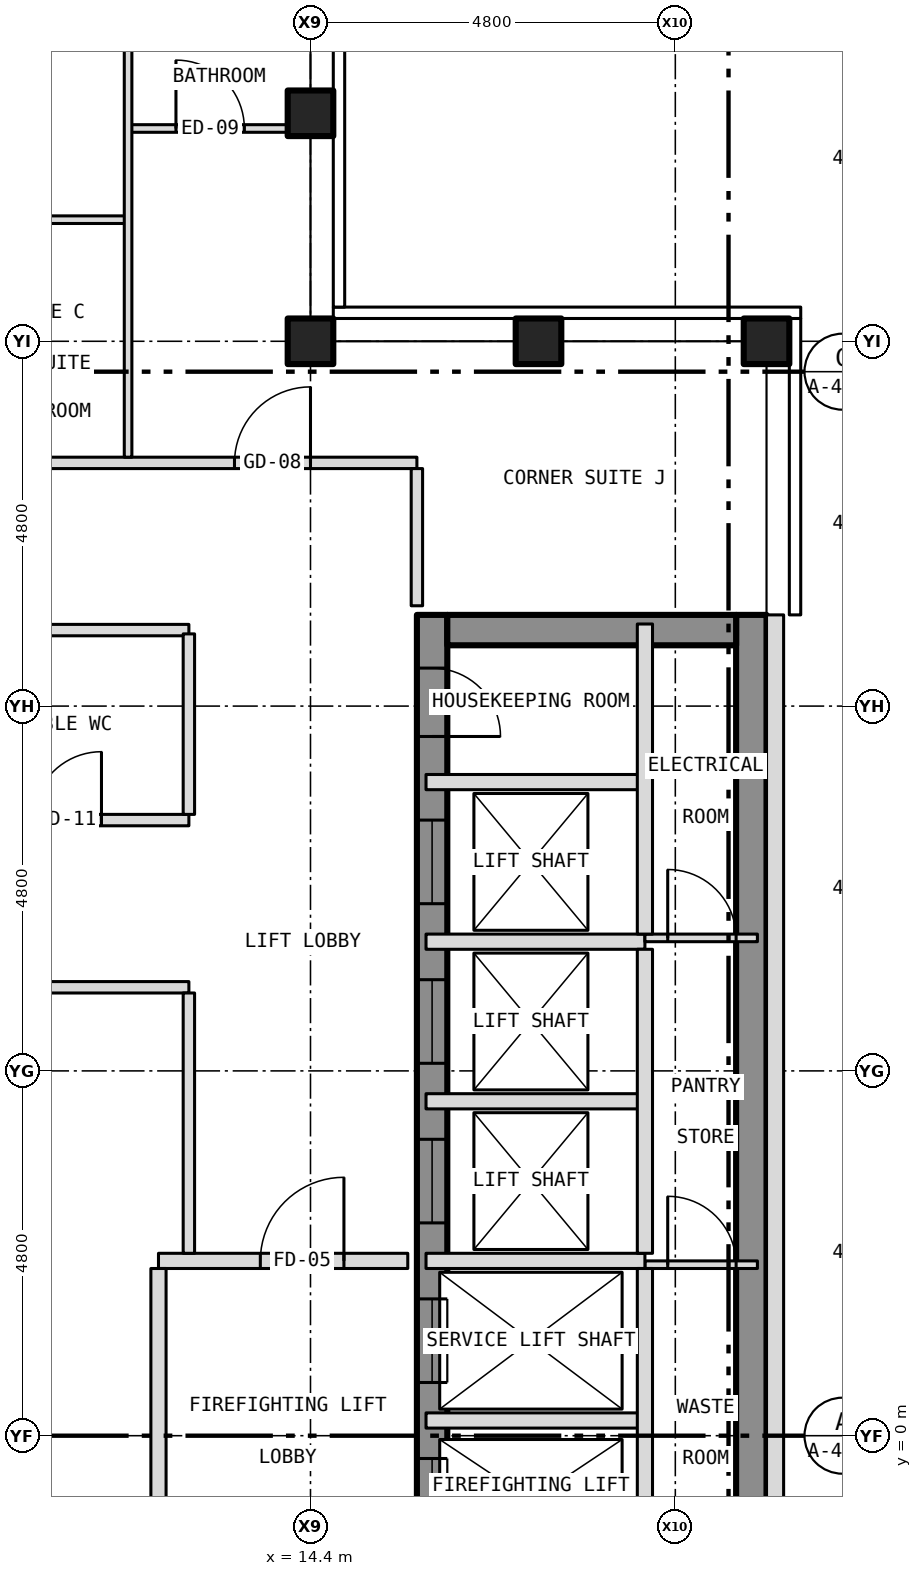
"""IFC4 building model, lengths in metres.
Left out: names, types, materials, properties, quantities, classifications, styles, units other than length and angle.
Written with IfcOpenShell. Run it as: python <this file> out.ifc"""

import sys

from ifc_helpers import new_model, si_unit, direction, frame, frame_2d, origin, origin_2d, place, context, subcontext, project, spatial, rectangle, hollow_rectangle, extrude, element, fill, save


model = new_model("IFC4")
c1 = context("Model", 3, precision=1e-05, world=origin(), true_north=direction((0.0, 1.0)))
c2 = subcontext(c1, "Body", "Model", "MODEL_VIEW")
j1 = project(units=[si_unit("LENGTHUNIT", "METRE"), si_unit("PLANEANGLEUNIT", "RADIAN")], contexts=[c1])
p1 = place(None, origin())
s1 = spatial("IfcSite", under=j1, at=p1, CompositionType="ELEMENT")
p2 = place(p1, origin())
s2 = spatial("IfcBuilding", under=s1, at=p2, CompositionType="ELEMENT")
p3 = place(p2, frame((0.0, 0.0, 255.0)))
s3 = spatial("IfcBuildingStorey", under=s2, at=p3, CompositionType="ELEMENT", Elevation=255.0)
for number, where, z_axis, x_axis in (
    (1, (20.4, 14.4, -0.15), (0.0, 0.0, 1.0), (1.0, 0.0, 0.0)),
    (2, (14.4, 14.4, -0.15), (0.0, 0.0, 1.0), (1.0, 0.0, 0.0)),
    (3, (14.4, 17.4, -0.15), (0.0, 0.0, 1.0), (1.0, 0.0, 0.0)),
    (4, (17.4, 14.4, -0.15), (0.0, 0.0, 1.0), (1.0, 0.0, 0.0)),
):
    element("IfcColumn", number, at=place(p3, frame(where, z_axis=z_axis, x_axis=x_axis)), inside=s3, PredefinedType="COLUMN", context=c2, shape_type="SweptSolid", body=[
        extrude(hollow_rectangle(XDim=0.6, YDim=0.6, WallThickness=0.03, at=origin_2d()), origin(), (0.0, 0.0, 1.0), 3.5),
    ])
p4 = place(p3, frame((16.0, -10.8, 0.0), z_axis=(0.0, 0.0, 1.0), x_axis=(0.0, 1.0, 0.0)))
e5 = element("IfcWall", 5, at=p4, inside=s3, PredefinedType="SHEAR", context=c2, shape_type="SweptSolid", body=[
    extrude(rectangle(XDim=21.6, YDim=0.4, at=frame_2d((10.8, 0.0))), origin(), (0.0, 0.0, 1.0), 3.25),
])
p5 = place(p4, frame((9.4, 0.0, 0.0)))
e6 = element("IfcOpeningElement", 6, at=p5, cuts=e5, PredefinedType="OPENING", context=c2, shape_type="SweptSolid", body=[
    extrude(rectangle(XDim=1.1, YDim=2.1, at=frame_2d((0.55, 1.05))), frame((0.0, 0.212, 0.0), z_axis=(0.0, -1.0, 0.0), x_axis=(1.0, 0.0, 0.0)), (0.0, 0.0, 1.0), 0.424),
])
p6 = place(p4, frame((11.5, 0.0, 0.0)))
e7 = element("IfcOpeningElement", 7, at=p6, cuts=e5, PredefinedType="OPENING", context=c2, shape_type="SweptSolid", body=[
    extrude(rectangle(XDim=1.1, YDim=2.1, at=frame_2d((0.55, 1.05))), frame((0.0, 0.212, 0.0), z_axis=(0.0, -1.0, 0.0), x_axis=(1.0, 0.0, 0.0)), (0.0, 0.0, 1.0), 0.424),
])
p7 = place(p4, frame((13.6, 0.0, 0.0)))
e8 = element("IfcOpeningElement", 8, at=p7, cuts=e5, PredefinedType="OPENING", context=c2, shape_type="SweptSolid", body=[
    extrude(rectangle(XDim=1.1, YDim=2.1, at=frame_2d((0.55, 1.05))), frame((0.0, 0.212, 0.0), z_axis=(0.0, -1.0, 0.0), x_axis=(1.0, 0.0, 0.0)), (0.0, 0.0, 1.0), 0.424),
])
p8 = place(p4, frame((15.7, 0.0, 0.0)))
e9 = element("IfcOpeningElement", 9, at=p8, cuts=e5, PredefinedType="OPENING", context=c2, shape_type="SweptSolid", body=[
    extrude(rectangle(XDim=1.1, YDim=2.1, at=frame_2d((0.55, 1.05))), frame((0.0, 0.212, 0.0), z_axis=(0.0, -1.0, 0.0), x_axis=(1.0, 0.0, 0.0)), (0.0, 0.0, 1.0), 0.424),
])
p9 = place(p4, frame((17.8, 0.0, 0.0)))
e10 = element("IfcOpeningElement", 10, at=p9, cuts=e5, PredefinedType="OPENING", context=c2, shape_type="SweptSolid", body=[
    extrude(rectangle(XDim=1.1, YDim=2.1, at=frame_2d((0.55, 1.05))), frame((0.0, 0.212, 0.0), z_axis=(0.0, -1.0, 0.0), x_axis=(1.0, 0.0, 0.0)), (0.0, 0.0, 1.0), 0.424),
])
p10 = place(p4, frame((5.642, 0.0, 0.0)))
e11 = element("IfcOpeningElement", 11, at=p10, cuts=e5, PredefinedType="OPENING", context=c2, shape_type="SweptSolid", body=[
    extrude(rectangle(XDim=1.1, YDim=2.1, at=frame_2d((0.55, 1.05))), frame((0.0, 0.212, 0.0), z_axis=(0.0, -1.0, 0.0), x_axis=(1.0, 0.0, 0.0)), (0.0, 0.0, 1.0), 0.424),
])
p11 = place(p4, frame((7.5, 0.0, 0.0)))
e12 = element("IfcOpeningElement", 12, at=p11, cuts=e5, PredefinedType="OPENING", context=c2, shape_type="SweptSolid", body=[
    extrude(rectangle(XDim=1.1, YDim=2.1, at=frame_2d((0.55, 1.05))), frame((0.0, 0.212, 0.0), z_axis=(0.0, -1.0, 0.0), x_axis=(1.0, 0.0, 0.0)), (0.0, 0.0, 1.0), 0.424),
])
p12 = place(p4, frame((20.0, 0.0, 0.0)))
e13 = element("IfcOpeningElement", 13, at=p12, cuts=e5, PredefinedType="OPENING", context=c2, shape_type="SweptSolid", body=[
    extrude(rectangle(XDim=0.9, YDim=2.1, at=frame_2d((0.45, 1.05))), frame((0.0, 0.212, 0.0), z_axis=(0.0, -1.0, 0.0), x_axis=(1.0, 0.0, 0.0)), (0.0, 0.0, 1.0), 0.424),
])
p13 = place(p3, frame((20.2, -10.8, 0.0), z_axis=(0.0, 0.0, 1.0), x_axis=(0.0, 1.0, 0.0)))
e14 = element("IfcWall", 14, at=p13, inside=s3, PredefinedType="SHEAR", context=c2, shape_type="SweptSolid", body=[
    extrude(rectangle(XDim=21.6, YDim=0.4, at=frame_2d((10.8, 0.0))), origin(), (0.0, 0.0, 1.0), 3.25),
])
p14 = place(p3, frame((16.2, 10.6, 0.0), z_axis=(0.0, 0.0, 1.0), x_axis=(1.0, 0.0, 0.0)))
e15 = element("IfcWall", 15, at=p14, inside=s3, PredefinedType="SHEAR", context=c2, shape_type="SweptSolid", body=[
    extrude(rectangle(XDim=3.8, YDim=0.4, at=frame_2d((1.9, 0.0))), origin(), (0.0, 0.0, 1.0), 3.25),
])
p15 = place(p3, frame((20.512, -10.8, 0.0), z_axis=(0.0, 0.0, 1.0), x_axis=(0.0, 1.0, 0.0)))
e16 = element("IfcWall", 16, at=p15, inside=s3, PredefinedType="SOLIDWALL", context=c2, shape_type="SweptSolid", body=[
    extrude(rectangle(XDim=21.6, YDim=0.225, at=frame_2d((10.8, 0.0))), origin(), (0.0, 0.0, 1.0), 3.5),
])
p16 = place(p15, frame((2.95, 0.0, 1.0)))
e17 = element("IfcOpeningElement", 17, at=p16, cuts=e16, PredefinedType="OPENING", context=c2, shape_type="SweptSolid", body=[
    extrude(rectangle(XDim=0.6, YDim=1.5, at=frame_2d((0.3, 0.75))), frame((0.0, 0.125, 0.0), z_axis=(0.0, -1.0, 0.0), x_axis=(1.0, 0.0, 0.0)), (0.0, 0.0, 1.0), 0.249),
])
p17 = place(p3, frame((15.92, 0.2, 0.0), z_axis=(0.0, 0.0, 1.0), x_axis=(1.0, 0.0, 0.0)))
e18 = element("IfcWall", 18, at=p17, inside=s3, PredefinedType="PARTITIONING", context=c2, shape_type="SweptSolid", body=[
    extrude(rectangle(XDim=2.88, YDim=0.2, at=frame_2d((1.44, 0.0))), origin(), (0.0, 0.0, 1.0), 3.25),
])
p18 = place(p3, frame((18.8, 2.25, 0.0), z_axis=(0.0, 0.0, 1.0), x_axis=(1.0, 0.0, 0.0)))
e19 = element("IfcWall", 19, at=p18, inside=s3, PredefinedType="PARTITIONING", context=c2, shape_type="SweptSolid", body=[
    extrude(rectangle(XDim=1.48, YDim=0.1, at=frame_2d((0.74, 0.0))), origin(), (0.0, 0.0, 1.0), 3.25),
])
p19 = place(p18, frame((0.3, 0.0, 0.0)))
e20 = element("IfcOpeningElement", 20, at=p19, cuts=e19, PredefinedType="OPENING", context=c2, shape_type="SweptSolid", body=[
    extrude(rectangle(XDim=0.9, YDim=2.1, at=frame_2d((0.45, 1.05))), frame((0.0, 0.062, 0.0), z_axis=(0.0, -1.0, 0.0), x_axis=(1.0, 0.0, 0.0)), (0.0, 0.0, 1.0), 0.124),
])
p20 = place(p3, frame((12.4, 2.3, 0.0), z_axis=(0.0, 0.0, 1.0), x_axis=(1.0, 0.0, 0.0)))
e21 = element("IfcWall", 21, at=p20, inside=s3, PredefinedType="PARTITIONING", context=c2, shape_type="SweptSolid", body=[
    extrude(rectangle(XDim=3.28, YDim=0.2, at=frame_2d((1.64, 0.0))), origin(), (0.0, 0.0, 1.0), 3.35),
])
p21 = place(p20, frame((1.34, 0.0, 0.0)))
e22 = element("IfcOpeningElement", 22, at=p21, cuts=e21, PredefinedType="OPENING", context=c2, shape_type="SweptSolid", body=[
    extrude(rectangle(XDim=1.1, YDim=2.1, at=frame_2d((0.55, 1.05))), frame((0.0, 0.112, 0.0), z_axis=(0.0, -1.0, 0.0), x_axis=(1.0, 0.0, 0.0)), (0.0, 0.0, 1.0), 0.224),
])
for number, where, z_axis, x_axis in (
    (23, (15.92, 2.3, 0.0), (0.0, 0.0, 1.0), (1.0, 0.0, 0.0)),
    (24, (15.92, 4.4, 0.0), (0.0, 0.0, 1.0), (1.0, 0.0, 0.0)),
):
    element("IfcWall", number, at=place(p3, frame(where, z_axis=z_axis, x_axis=x_axis)), inside=s3, PredefinedType="PARTITIONING", context=c2, shape_type="SweptSolid", body=[
        extrude(rectangle(XDim=2.88, YDim=0.2, at=frame_2d((1.44, 0.0))), origin(), (0.0, 0.0, 1.0), 3.25),
    ])
p22 = place(p3, frame((4.8, 5.9, 0.0), z_axis=(0.0, 0.0, 1.0), x_axis=(1.0, 0.0, 0.0)))
e25 = element("IfcWall", 25, at=p22, inside=s3, PredefinedType="PARTITIONING", context=c2, shape_type="SweptSolid", body=[
    extrude(rectangle(XDim=8.0, YDim=0.15, at=frame_2d((4.0, 0.0))), origin(), (0.0, 0.0, 1.0), 3.35),
])
p23 = place(p3, frame((15.92, 6.5, 0.0), z_axis=(0.0, 0.0, 1.0), x_axis=(1.0, 0.0, 0.0)))
e26 = element("IfcWall", 26, at=p23, inside=s3, PredefinedType="PARTITIONING", context=c2, shape_type="SweptSolid", body=[
    extrude(rectangle(XDim=2.88, YDim=0.2, at=frame_2d((1.44, 0.0))), origin(), (0.0, 0.0, 1.0), 3.25),
])
p24 = place(p3, frame((18.8, 6.55, 0.0), z_axis=(0.0, 0.0, 1.0), x_axis=(1.0, 0.0, 0.0)))
e27 = element("IfcWall", 27, at=p24, inside=s3, PredefinedType="PARTITIONING", context=c2, shape_type="SweptSolid", body=[
    extrude(rectangle(XDim=1.48, YDim=0.1, at=frame_2d((0.74, 0.0))), origin(), (0.0, 0.0, 1.0), 3.25),
])
p25 = place(p24, frame((0.3, 0.0, 0.0)))
e28 = element("IfcOpeningElement", 28, at=p25, cuts=e27, PredefinedType="OPENING", context=c2, shape_type="SweptSolid", body=[
    extrude(rectangle(XDim=0.9, YDim=2.1, at=frame_2d((0.45, 1.05))), frame((0.0, 0.062, 0.0), z_axis=(0.0, -1.0, 0.0), x_axis=(1.0, 0.0, 0.0)), (0.0, 0.0, 1.0), 0.124),
])
p26 = place(p3, frame((4.8, 8.1, 0.0), z_axis=(0.0, 0.0, 1.0), x_axis=(1.0, 0.0, 0.0)))
e29 = element("IfcWall", 29, at=p26, inside=s3, PredefinedType="PARTITIONING", context=c2, shape_type="SweptSolid", body=[
    extrude(rectangle(XDim=8.0, YDim=0.15, at=frame_2d((4.0, 0.0))), origin(), (0.0, 0.0, 1.0), 3.35),
])
p27 = place(p26, frame((5.95, 0.0, 0.0)))
e30 = element("IfcOpeningElement", 30, at=p27, cuts=e29, PredefinedType="OPENING", context=c2, shape_type="SweptSolid", body=[
    extrude(rectangle(XDim=0.9, YDim=2.1, at=frame_2d((0.45, 1.05))), frame((0.0, 0.087, 0.0), z_axis=(0.0, -1.0, 0.0), x_axis=(1.0, 0.0, 0.0)), (0.0, 0.0, 1.0), 0.174),
])
p28 = place(p3, frame((15.92, 8.6, 0.0), z_axis=(0.0, 0.0, 1.0), x_axis=(1.0, 0.0, 0.0)))
e31 = element("IfcWall", 31, at=p28, inside=s3, PredefinedType="PARTITIONING", context=c2, shape_type="SweptSolid", body=[
    extrude(rectangle(XDim=2.88, YDim=0.2, at=frame_2d((1.44, 0.0))), origin(), (0.0, 0.0, 1.0), 3.25),
])
p29 = place(p3, frame((4.8, 10.6, 0.0), z_axis=(0.0, 0.0, 1.0), x_axis=(1.0, 0.0, 0.0)))
e32 = element("IfcWall", 32, at=p29, inside=s3, PredefinedType="PARTITIONING", context=c2, shape_type="SweptSolid", body=[
    extrude(rectangle(XDim=8.0, YDim=0.15, at=frame_2d((4.0, 0.0))), origin(), (0.0, 0.0, 1.0), 3.35),
])
p30 = place(p29, frame((1.55, 0.0, 0.0)))
e33 = element("IfcOpeningElement", 33, at=p30, cuts=e32, PredefinedType="OPENING", context=c2, shape_type="SweptSolid", body=[
    extrude(rectangle(XDim=0.9, YDim=2.1, at=frame_2d((0.45, 1.05))), frame((0.0, 0.087, 0.0), z_axis=(0.0, -1.0, 0.0), x_axis=(1.0, 0.0, 0.0)), (0.0, 0.0, 1.0), 0.174),
])
p31 = place(p3, frame((-15.8, 12.8, 0.0), z_axis=(0.0, 0.0, 1.0), x_axis=(1.0, 0.0, 0.0)))
e34 = element("IfcWall", 34, at=p31, inside=s3, PredefinedType="PARTITIONING", context=c2, shape_type="SweptSolid", body=[
    extrude(rectangle(XDim=31.6, YDim=0.15, at=frame_2d((15.8, 0.0))), origin(), (0.0, 0.0, 1.0), 3.35),
])
p32 = place(p31, frame((4.6, 0.0, 0.0)))
e35 = element("IfcOpeningElement", 35, at=p32, cuts=e34, PredefinedType="OPENING", context=c2, shape_type="SweptSolid", body=[
    extrude(rectangle(XDim=1.0, YDim=2.1, at=frame_2d((0.5, 1.05))), frame((0.0, 0.087, 0.0), z_axis=(0.0, -1.0, 0.0), x_axis=(1.0, 0.0, 0.0)), (0.0, 0.0, 1.0), 0.174),
])
p33 = place(p31, frame((10.26, 0.0, 0.0)))
e36 = element("IfcOpeningElement", 36, at=p33, cuts=e34, PredefinedType="OPENING", context=c2, shape_type="SweptSolid", body=[
    extrude(rectangle(XDim=1.0, YDim=2.1, at=frame_2d((0.5, 1.05))), frame((0.0, 0.087, 0.0), z_axis=(0.0, -1.0, 0.0), x_axis=(1.0, 0.0, 0.0)), (0.0, 0.0, 1.0), 0.174),
])
p34 = place(p31, frame((19.86, 0.0, 0.0)))
e37 = element("IfcOpeningElement", 37, at=p34, cuts=e34, PredefinedType="OPENING", context=c2, shape_type="SweptSolid", body=[
    extrude(rectangle(XDim=1.0, YDim=2.1, at=frame_2d((0.5, 1.05))), frame((0.0, 0.087, 0.0), z_axis=(0.0, -1.0, 0.0), x_axis=(1.0, 0.0, 0.0)), (0.0, 0.0, 1.0), 0.174),
])
p35 = place(p31, frame((1.4, 0.0, 0.0)))
e38 = element("IfcOpeningElement", 38, at=p35, cuts=e34, PredefinedType="OPENING", context=c2, shape_type="SweptSolid", body=[
    extrude(rectangle(XDim=1.0, YDim=2.1, at=frame_2d((0.5, 1.05))), frame((0.0, 0.087, 0.0), z_axis=(0.0, -1.0, 0.0), x_axis=(1.0, 0.0, 0.0)), (0.0, 0.0, 1.0), 0.174),
])
p36 = place(p31, frame((29.2, 0.0, 0.0)))
e39 = element("IfcOpeningElement", 39, at=p36, cuts=e34, PredefinedType="OPENING", context=c2, shape_type="SweptSolid", body=[
    extrude(rectangle(XDim=1.0, YDim=2.1, at=frame_2d((0.5, 1.05))), frame((0.0, 0.087, 0.0), z_axis=(0.0, -1.0, 0.0), x_axis=(1.0, 0.0, 0.0)), (0.0, 0.0, 1.0), 0.174),
])
p37 = place(p3, frame((9.8, 16.0, 0.0), z_axis=(0.0, 0.0, 1.0), x_axis=(1.0, 0.0, 0.0)))
e40 = element("IfcWall", 40, at=p37, inside=s3, PredefinedType="PARTITIONING", context=c2, shape_type="SweptSolid", body=[
    extrude(rectangle(XDim=2.2, YDim=0.1, at=frame_2d((1.1, 0.0))), origin(), (0.0, 0.0, 1.0), 3.35),
])
p38 = place(p3, frame((12.0, 17.2, 0.0), z_axis=(0.0, 0.0, 1.0), x_axis=(1.0, 0.0, 0.0)))
e41 = element("IfcWall", 41, at=p38, inside=s3, PredefinedType="PARTITIONING", context=c2, shape_type="SweptSolid", body=[
    extrude(rectangle(XDim=2.28, YDim=0.1, at=frame_2d((1.14, 0.0))), origin(), (0.0, 0.0, 1.0), 3.35),
])
p39 = place(p38, frame((0.63, 0.0, 0.0)))
e42 = element("IfcOpeningElement", 42, at=p39, cuts=e41, PredefinedType="OPENING", context=c2, shape_type="SweptSolid", body=[
    extrude(rectangle(XDim=0.9, YDim=2.1, at=frame_2d((0.45, 1.05))), frame((0.0, 0.062, 0.0), z_axis=(0.0, -1.0, 0.0), x_axis=(1.0, 0.0, 0.0)), (0.0, 0.0, 1.0), 0.124),
])
p40 = place(p3, frame((12.0, 12.875, 0.0), z_axis=(0.0, 0.0, 1.0), x_axis=(0.0, 1.0, 0.0)))
e43 = element("IfcWall", 43, at=p40, inside=s3, PredefinedType="PARTITIONING", context=c2, shape_type="SweptSolid", body=[
    extrude(rectangle(XDim=7.855, YDim=0.1, at=frame_2d((3.927, 0.0))), origin(), (0.0, 0.0, 1.0), 3.35),
])
p41 = place(p3, frame((12.4, -1.8, 0.0), z_axis=(0.0, 0.0, 1.0), x_axis=(0.0, 1.0, 0.0)))
e44 = element("IfcWall", 44, at=p41, inside=s3, PredefinedType="PARTITIONING", context=c2, shape_type="SweptSolid", body=[
    extrude(rectangle(XDim=4.0, YDim=0.2, at=frame_2d((2.0, 0.0))), origin(), (0.0, 0.0, 1.0), 3.35),
])
p42 = place(p3, frame((12.8, 2.4, 0.0), z_axis=(0.0, 0.0, 1.0), x_axis=(0.0, 1.0, 0.0)))
e45 = element("IfcWall", 45, at=p42, inside=s3, PredefinedType="PARTITIONING", context=c2, shape_type="SweptSolid", body=[
    extrude(rectangle(XDim=3.425, YDim=0.15, at=frame_2d((1.712, 0.0))), origin(), (0.0, 0.0, 1.0), 3.35),
])
p43 = place(p3, frame((12.8, 8.175, 0.0), z_axis=(0.0, 0.0, 1.0), x_axis=(0.0, 1.0, 0.0)))
e46 = element("IfcWall", 46, at=p43, inside=s3, PredefinedType="PARTITIONING", context=c2, shape_type="SweptSolid", body=[
    extrude(rectangle(XDim=2.375, YDim=0.15, at=frame_2d((1.188, 0.0))), origin(), (0.0, 0.0, 1.0), 3.35),
])
p44 = place(p3, frame((15.8, 10.92, 0.0), z_axis=(0.0, 0.0, 1.0), x_axis=(0.0, 1.0, 0.0)))
e47 = element("IfcWall", 47, at=p44, inside=s3, PredefinedType="PARTITIONING", context=c2, shape_type="SweptSolid", body=[
    extrude(rectangle(XDim=1.805, YDim=0.15, at=frame_2d((0.903, 0.0))), origin(), (0.0, 0.0, 1.0), 3.35),
])
for number, where, z_axis, x_axis in (
    (48, (18.8, -1.8, 0.0), (0.0, 0.0, 1.0), (0.0, 1.0, 0.0)),
    (49, (18.8, 2.4, 0.0), (0.0, 0.0, 1.0), (0.0, 1.0, 0.0)),
):
    element("IfcWall", number, at=place(p3, frame(where, z_axis=z_axis, x_axis=x_axis)), inside=s3, PredefinedType="PARTITIONING", context=c2, shape_type="SweptSolid", body=[
        extrude(rectangle(XDim=4.0, YDim=0.2, at=frame_2d((2.0, 0.0))), origin(), (0.0, 0.0, 1.0), 3.25),
    ])
p45 = place(p3, frame((18.8, 6.6, 0.0), z_axis=(0.0, 0.0, 1.0), x_axis=(0.0, 1.0, 0.0)))
e50 = element("IfcWall", 50, at=p45, inside=s3, PredefinedType="PARTITIONING", context=c2, shape_type="SweptSolid", body=[
    extrude(rectangle(XDim=4.08, YDim=0.2, at=frame_2d((2.04, 0.0))), origin(), (0.0, 0.0, 1.0), 3.25),
])
p46 = place(p5, origin())
e51 = element("IfcDoor", 51, at=p46, inside=s3, OperationType="SLIDING_TO_LEFT", PredefinedType="DOOR", context=c2, shape_type="SweptSolid", body=[
    extrude(rectangle(XDim=1.1, YDim=2.1, at=frame_2d((0.55, 1.05))), frame((0.0, 0.025, 0.0), z_axis=(0.0, -1.0, 0.0), x_axis=(1.0, 0.0, 0.0)), (0.0, 0.0, 1.0), 0.05),
])
fill(e6, e51)
p47 = place(p6, origin())
e52 = element("IfcDoor", 52, at=p47, inside=s3, OperationType="SLIDING_TO_LEFT", PredefinedType="DOOR", context=c2, shape_type="SweptSolid", body=[
    extrude(rectangle(XDim=1.1, YDim=2.1, at=frame_2d((0.55, 1.05))), frame((0.0, 0.025, 0.0), z_axis=(0.0, -1.0, 0.0), x_axis=(1.0, 0.0, 0.0)), (0.0, 0.0, 1.0), 0.05),
])
fill(e7, e52)
p48 = place(p7, origin())
e53 = element("IfcDoor", 53, at=p48, inside=s3, OperationType="SLIDING_TO_LEFT", PredefinedType="DOOR", context=c2, shape_type="SweptSolid", body=[
    extrude(rectangle(XDim=1.1, YDim=2.1, at=frame_2d((0.55, 1.05))), frame((0.0, 0.025, 0.0), z_axis=(0.0, -1.0, 0.0), x_axis=(1.0, 0.0, 0.0)), (0.0, 0.0, 1.0), 0.05),
])
fill(e8, e53)
p49 = place(p8, origin())
e54 = element("IfcDoor", 54, at=p49, inside=s3, OperationType="SLIDING_TO_LEFT", PredefinedType="DOOR", context=c2, shape_type="SweptSolid", body=[
    extrude(rectangle(XDim=1.1, YDim=2.1, at=frame_2d((0.55, 1.05))), frame((0.0, 0.025, 0.0), z_axis=(0.0, -1.0, 0.0), x_axis=(1.0, 0.0, 0.0)), (0.0, 0.0, 1.0), 0.05),
])
fill(e9, e54)
p50 = place(p9, origin())
e55 = element("IfcDoor", 55, at=p50, inside=s3, OperationType="SLIDING_TO_LEFT", PredefinedType="DOOR", context=c2, shape_type="SweptSolid", body=[
    extrude(rectangle(XDim=1.1, YDim=2.1, at=frame_2d((0.55, 1.05))), frame((0.0, 0.025, 0.0), z_axis=(0.0, -1.0, 0.0), x_axis=(1.0, 0.0, 0.0)), (0.0, 0.0, 1.0), 0.05),
])
fill(e10, e55)
p51 = place(p12, origin())
e56 = element("IfcDoor", 56, at=p51, inside=s3, OperationType="SINGLE_SWING_LEFT", PredefinedType="DOOR", context=c2, shape_type="SweptSolid", body=[
    extrude(rectangle(XDim=0.9, YDim=2.1, at=frame_2d((0.45, 1.05))), frame((0.0, 0.025, 0.0), z_axis=(0.0, -1.0, 0.0), x_axis=(1.0, 0.0, 0.0)), (0.0, 0.0, 1.0), 0.05),
])
fill(e13, e56)
p52 = place(p19, origin())
e57 = element("IfcDoor", 57, at=p52, inside=s3, OperationType="SINGLE_SWING_LEFT", PredefinedType="DOOR", context=c2, shape_type="SweptSolid", body=[
    extrude(rectangle(XDim=0.9, YDim=2.1, at=frame_2d((0.45, 1.05))), frame((0.0, 0.025, 0.0), z_axis=(0.0, -1.0, 0.0), x_axis=(1.0, 0.0, 0.0)), (0.0, 0.0, 1.0), 0.05),
])
fill(e20, e57)
p53 = place(p25, origin())
e58 = element("IfcDoor", 58, at=p53, inside=s3, OperationType="SINGLE_SWING_LEFT", PredefinedType="DOOR", context=c2, shape_type="SweptSolid", body=[
    extrude(rectangle(XDim=0.9, YDim=2.1, at=frame_2d((0.45, 1.05))), frame((0.0, 0.025, 0.0), z_axis=(0.0, -1.0, 0.0), x_axis=(1.0, 0.0, 0.0)), (0.0, 0.0, 1.0), 0.05),
])
fill(e28, e58)
p54 = place(p21, origin())
e59 = element("IfcDoor", 59, at=p54, inside=s3, OperationType="SINGLE_SWING_RIGHT", PredefinedType="DOOR", context=c2, shape_type="SweptSolid", body=[
    extrude(rectangle(XDim=1.1, YDim=2.1, at=frame_2d((0.55, 1.05))), frame((0.0, 0.025, 0.0), z_axis=(0.0, -1.0, 0.0), x_axis=(1.0, 0.0, 0.0)), (0.0, 0.0, 1.0), 0.05),
])
fill(e22, e59)
p55 = place(p39, origin())
e60 = element("IfcDoor", 60, at=p55, inside=s3, OperationType="SINGLE_SWING_LEFT", PredefinedType="DOOR", context=c2, shape_type="SweptSolid", body=[
    extrude(rectangle(XDim=0.9, YDim=2.1, at=frame_2d((0.45, 1.05))), frame((0.0, 0.025, 0.0), z_axis=(0.0, -1.0, 0.0), x_axis=(1.0, 0.0, 0.0)), (0.0, 0.0, 1.0), 0.05),
])
fill(e42, e60)
p56 = place(p36, origin())
e61 = element("IfcDoor", 61, at=p56, inside=s3, OperationType="SINGLE_SWING_RIGHT", PredefinedType="DOOR", context=c2, shape_type="SweptSolid", body=[
    extrude(rectangle(XDim=1.0, YDim=2.1, at=frame_2d((0.5, 1.05))), frame((0.0, 0.025, 0.0), z_axis=(0.0, -1.0, 0.0), x_axis=(1.0, 0.0, 0.0)), (0.0, 0.0, 1.0), 0.05),
])
fill(e39, e61)
p57 = place(p27, origin())
e62 = element("IfcDoor", 62, at=p57, inside=s3, OperationType="SINGLE_SWING_RIGHT", PredefinedType="DOOR", context=c2, shape_type="SweptSolid", body=[
    extrude(rectangle(XDim=0.9, YDim=2.1, at=frame_2d((0.45, 1.05))), frame((0.0, 0.025, 0.0), z_axis=(0.0, -1.0, 0.0), x_axis=(1.0, 0.0, 0.0)), (0.0, 0.0, 1.0), 0.05),
])
fill(e30, e62)
save(model, sys.argv[1])
